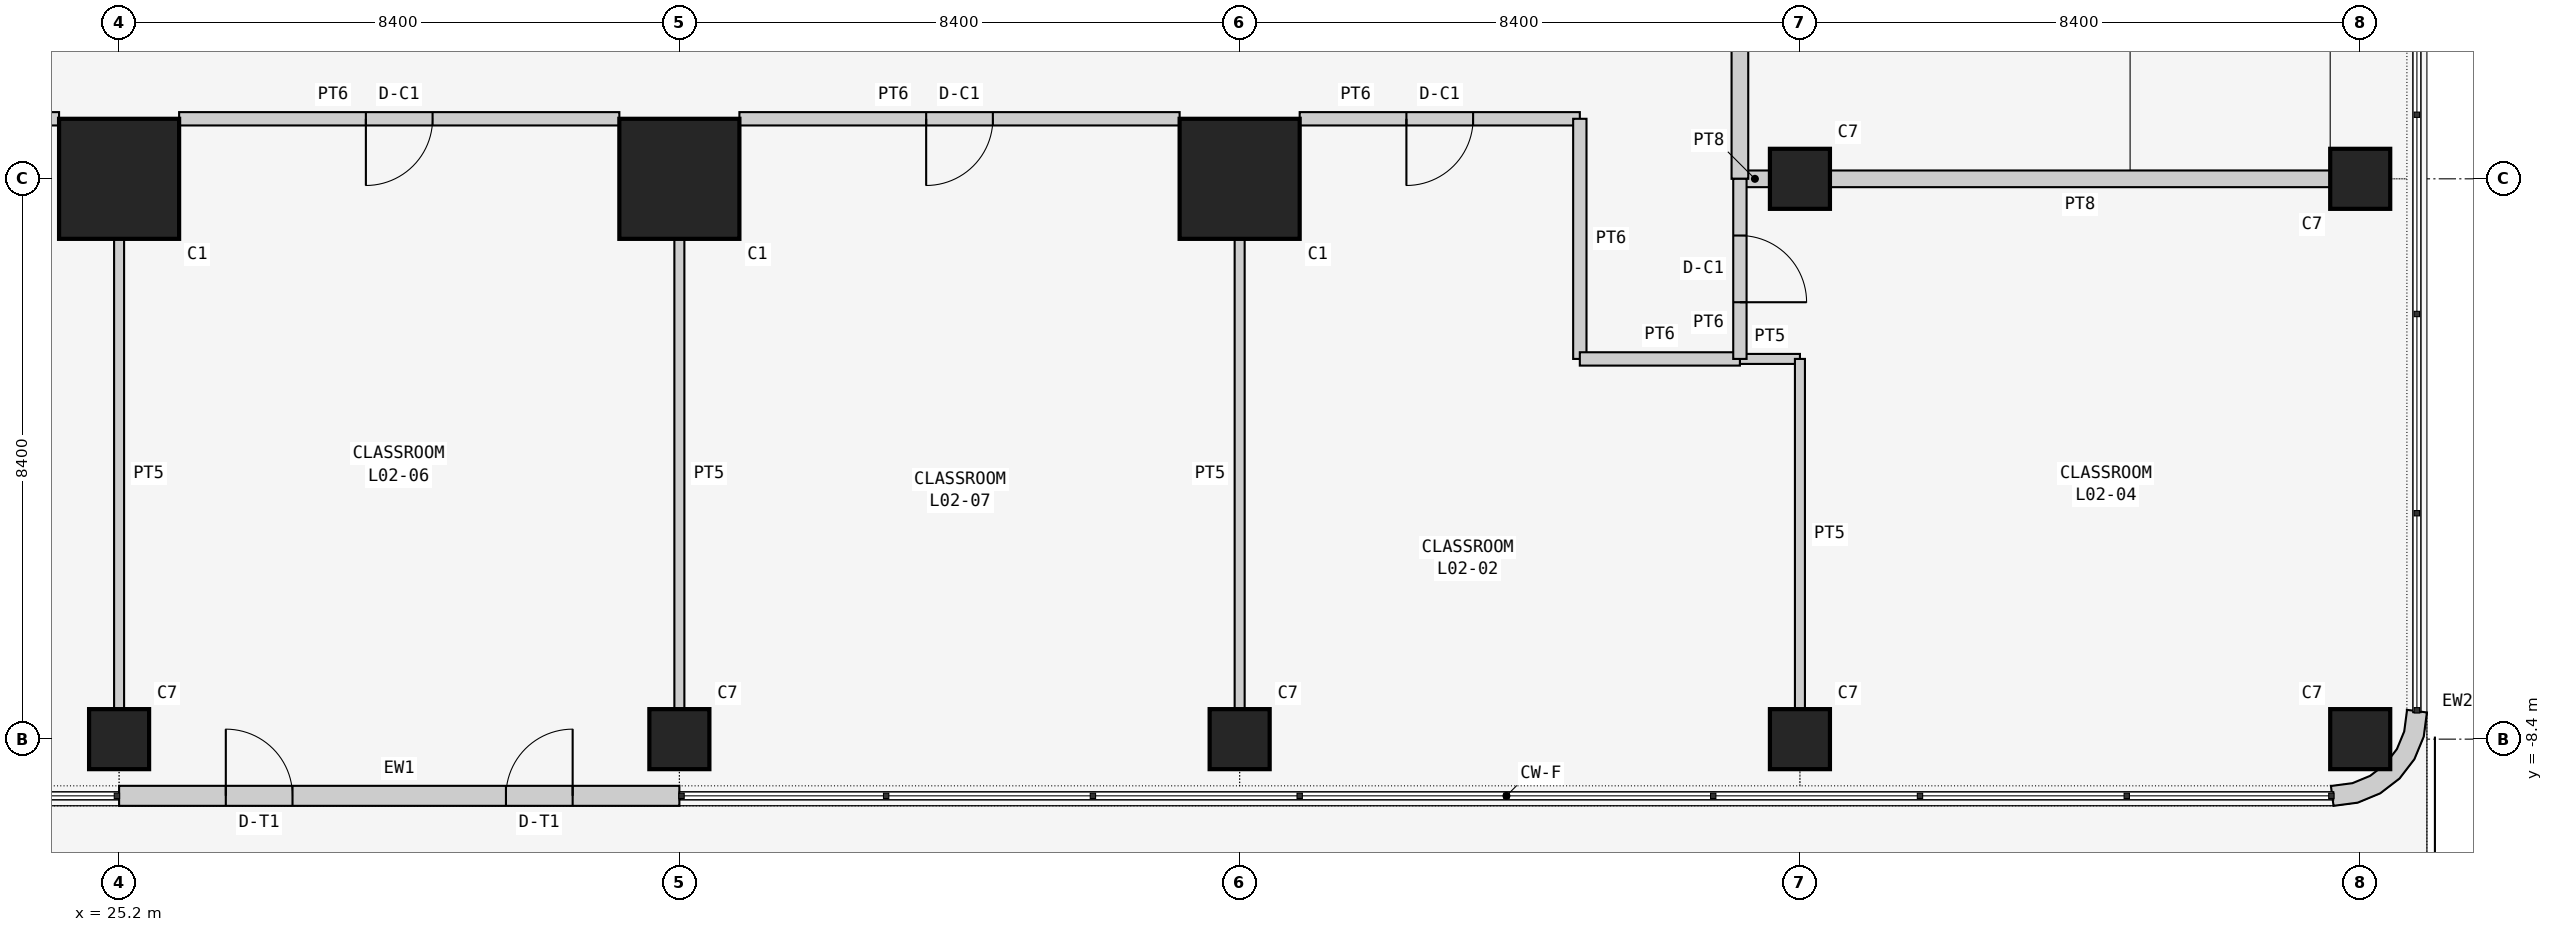
"""IFC4 building model, lengths in metres.
Left out: names, types, materials, properties, quantities, classifications, styles, units other than length and angle.
Written with IfcOpenShell. Run it as: python <this file> out.ifc"""

import sys

from ifc_helpers import new_model, si_unit, direction, frame, frame_2d, origin, origin_2d, place, context, subcontext, project, spatial, polyline, rectangle, outline, extrude, element, fill, save


model = new_model("IFC4")
c1 = context("Model", 3, precision=1e-05, world=origin(), true_north=direction((0.0, 1.0)))
c2 = subcontext(c1, "Body", "Model", "MODEL_VIEW")
j1 = project(units=[si_unit("LENGTHUNIT", "METRE"), si_unit("PLANEANGLEUNIT", "RADIAN")], contexts=[c1])
p1 = place(None, origin())
s1 = spatial("IfcSite", under=j1, at=p1, CompositionType="ELEMENT")
p2 = place(p1, origin())
s2 = spatial("IfcBuilding", under=s1, at=p2, CompositionType="ELEMENT")
p3 = place(p2, frame((0.0, 0.0, 10.5)))
s3 = spatial("IfcBuildingStorey", under=s2, at=p3, CompositionType="ELEMENT", Elevation=10.5)
p4 = place(p3, frame((25.2, -8.4, 0.0), z_axis=(0.0, 0.0, 1.0), x_axis=(1.0, 0.0, 0.0)))
e1 = element("IfcColumn", 1, at=p4, inside=s3, PredefinedType="COLUMN", context=c2, shape_type="SweptSolid", body=[
    extrude(rectangle(XDim=0.9, YDim=0.9, at=origin_2d()), origin(), (0.0, 0.0, 1.0), 4.5),
])
p5 = place(p3, frame((25.2, 0.0, 0.0), z_axis=(0.0, 0.0, 1.0), x_axis=(1.0, 0.0, 0.0)))
e2 = element("IfcColumn", 2, at=p5, inside=s3, PredefinedType="COLUMN", context=c2, shape_type="SweptSolid", body=[
    extrude(rectangle(XDim=1.8, YDim=1.8, at=origin_2d()), origin(), (0.0, 0.0, 1.0), 4.5),
])
p6 = place(p3, frame((33.6, -8.4, 0.0), z_axis=(0.0, 0.0, 1.0), x_axis=(1.0, 0.0, 0.0)))
e3 = element("IfcColumn", 3, at=p6, inside=s3, PredefinedType="COLUMN", context=c2, shape_type="SweptSolid", body=[
    extrude(rectangle(XDim=0.9, YDim=0.9, at=origin_2d()), origin(), (0.0, 0.0, 1.0), 4.5),
])
p7 = place(p3, frame((33.6, 0.0, 0.0), z_axis=(0.0, 0.0, 1.0), x_axis=(1.0, 0.0, 0.0)))
e4 = element("IfcColumn", 4, at=p7, inside=s3, PredefinedType="COLUMN", context=c2, shape_type="SweptSolid", body=[
    extrude(rectangle(XDim=1.8, YDim=1.8, at=origin_2d()), origin(), (0.0, 0.0, 1.0), 4.5),
])
p8 = place(p3, frame((42.0, -8.4, 0.0), z_axis=(0.0, 0.0, 1.0), x_axis=(1.0, 0.0, 0.0)))
e5 = element("IfcColumn", 5, at=p8, inside=s3, PredefinedType="COLUMN", context=c2, shape_type="SweptSolid", body=[
    extrude(rectangle(XDim=0.9, YDim=0.9, at=origin_2d()), origin(), (0.0, 0.0, 1.0), 4.5),
])
p9 = place(p3, frame((42.0, 0.0, 0.0), z_axis=(0.0, 0.0, 1.0), x_axis=(1.0, 0.0, 0.0)))
e6 = element("IfcColumn", 6, at=p9, inside=s3, PredefinedType="COLUMN", context=c2, shape_type="SweptSolid", body=[
    extrude(rectangle(XDim=1.8, YDim=1.8, at=origin_2d()), origin(), (0.0, 0.0, 1.0), 4.5),
])
for number, where, z_axis, x_axis in (
    (7, (50.4, -8.4, 0.0), (0.0, 0.0, 1.0), (1.0, 0.0, 0.0)),
    (8, (50.4, 0.0, 0.0), (0.0, 0.0, 1.0), (1.0, 0.0, 0.0)),
    (9, (58.8, -8.4, 0.0), (0.0, 0.0, 1.0), (1.0, 0.0, 0.0)),
    (10, (58.8, 0.0, 0.0), (0.0, 0.0, 1.0), (1.0, 0.0, 0.0)),
):
    element("IfcColumn", number, at=place(p3, frame(where, z_axis=z_axis, x_axis=x_axis)), inside=s3, PredefinedType="COLUMN", context=c2, shape_type="SweptSolid", body=[
        extrude(rectangle(XDim=0.9, YDim=0.9, at=origin_2d()), origin(), (0.0, 0.0, 1.0), 4.5),
    ])
p10 = place(p3, frame((25.2, -9.25, 0.0), z_axis=(0.0, 0.0, 1.0), x_axis=(1.0, 0.0, 0.0)))
e11 = element("IfcWall", 11, at=p10, inside=s3, PredefinedType="SOLIDWALL", context=c2, shape_type="SweptSolid", body=[
    extrude(rectangle(XDim=8.4, YDim=0.3, at=frame_2d((4.2, 0.0))), origin(), (0.0, 0.0, 1.0), 4.3),
])
p11 = place(p10, frame((1.6, 0.0, 0.0)))
e12 = element("IfcOpeningElement", 12, at=p11, cuts=e11, PredefinedType="OPENING", context=c2, shape_type="SweptSolid", body=[
    extrude(rectangle(XDim=1.0, YDim=2.4, at=frame_2d((0.5, 1.2))), frame((0.0, 0.16, 0.0), z_axis=(0.0, -1.0, 0.0), x_axis=(1.0, 0.0, 0.0)), (0.0, 0.0, 1.0), 0.32),
])
p12 = place(p10, frame((5.8, 0.0, 0.0)))
e13 = element("IfcOpeningElement", 13, at=p12, cuts=e11, PredefinedType="OPENING", context=c2, shape_type="SweptSolid", body=[
    extrude(rectangle(XDim=1.0, YDim=2.4, at=frame_2d((0.5, 1.2))), frame((0.0, 0.16, 0.0), z_axis=(0.0, -1.0, 0.0), x_axis=(1.0, 0.0, 0.0)), (0.0, 0.0, 1.0), 0.32),
])
p13 = place(p3, frame((58.355, -9.248, 0.0), z_axis=(0.0, 0.0, 1.0), x_axis=(0.707106781187, -0.707106781187, 0.0)))
e14 = element("IfcWall", 14, at=p13, inside=s3, PredefinedType="SOLIDWALL", context=c2, shape_type="SweptSolid", body=[
    extrude(outline(polyline([(0.139, 1.904), (-0.101, 1.72), (-0.087, 1.706), (0.1, 1.463), (0.209, 1.198), (0.246, 0.914), (0.209, 0.63), (0.1, 0.365), (-0.087, 0.122), (-0.101, 0.108), (0.139, -0.076), (0.362, 0.214), (0.502, 0.552), (0.549, 0.914), (0.501, 1.276), (0.362, 1.614), (0.139, 1.904)])), origin(), (0.0, 0.0, 1.0), 4.3),
])
p14 = place(p3, frame((49.95, 0.0, 0.0), z_axis=(0.0, 0.0, 1.0), x_axis=(-1.0, 0.0, 0.0)))
e15 = element("IfcWall", 15, at=p14, inside=s3, PredefinedType="SOLIDWALL", context=c2, shape_type="SweptSolid", body=[
    extrude(rectangle(XDim=0.45, YDim=0.25, at=frame_2d((0.225, 0.0))), origin(), (0.0, 0.0, 1.0), 3.543),
])
p15 = place(p3, frame((58.35, 0.0, 0.0), z_axis=(0.0, 0.0, 1.0), x_axis=(-1.0, 0.0, 0.0)))
e16 = element("IfcWall", 16, at=p15, inside=s3, PredefinedType="SOLIDWALL", context=c2, shape_type="SweptSolid", body=[
    extrude(rectangle(XDim=7.5, YDim=0.25, at=frame_2d((3.75, 0.0))), origin(), (0.0, 0.0, 1.0), 3.543),
])
p16 = place(p3, frame((49.5, 0.0, 0.0), z_axis=(0.0, 0.0, 1.0), x_axis=(0.0, 1.0, 0.0)))
e17 = element("IfcWall", 17, at=p16, inside=s3, PredefinedType="SOLIDWALL", context=c2, shape_type="SweptSolid", body=[
    extrude(rectangle(XDim=8.4, YDim=0.25, at=frame_2d((4.2, 0.0))), origin(), (0.0, 0.0, 1.0), 4.3),
])
p17 = place(p16, frame((3.6, 0.0, 0.0)))
e18 = element("IfcOpeningElement", 18, at=p17, cuts=e17, PredefinedType="OPENING", context=c2, shape_type="SweptSolid", body=[
    extrude(rectangle(XDim=1.2, YDim=2.1, at=frame_2d((0.6, 1.05))), frame((0.0, 0.135, 0.0), z_axis=(0.0, -1.0, 0.0), x_axis=(1.0, 0.0, 0.0)), (0.0, 0.0, 1.0), 0.27),
])
p18 = place(p3, frame((49.5, -2.7, 0.0), z_axis=(0.0, 0.0, 1.0), x_axis=(1.0, 0.0, 0.0)))
e19 = element("IfcWall", 19, at=p18, inside=s3, PredefinedType="PARTITIONING", context=c2, shape_type="SweptSolid", body=[
    extrude(rectangle(XDim=0.9, YDim=0.15, at=frame_2d((0.45, 0.0))), origin(), (0.0, 0.0, 1.0), 4.3),
])
p19 = place(p3, frame((50.4, -2.7, 0.0), z_axis=(0.0, 0.0, 1.0), x_axis=(0.0, -1.0, 0.0)))
e20 = element("IfcWall", 20, at=p19, inside=s3, PredefinedType="PARTITIONING", context=c2, shape_type="SweptSolid", body=[
    extrude(rectangle(XDim=5.25, YDim=0.15, at=frame_2d((2.625, 0.0))), origin(), (0.0, 0.0, 1.0), 3.543),
])
p20 = place(p3, frame((42.0, -7.95, 0.0), z_axis=(0.0, 0.0, 1.0), x_axis=(0.0, 1.0, 0.0)))
e21 = element("IfcWall", 21, at=p20, inside=s3, PredefinedType="PARTITIONING", context=c2, shape_type="SweptSolid", body=[
    extrude(rectangle(XDim=7.05, YDim=0.15, at=frame_2d((3.525, 0.0))), origin(), (0.0, 0.0, 1.0), 3.543),
])
p21 = place(p3, frame((42.9, 0.9, 0.0), z_axis=(0.0, 0.0, 1.0), x_axis=(1.0, 0.0, 0.0)))
e22 = element("IfcWall", 22, at=p21, inside=s3, PredefinedType="PARTITIONING", context=c2, shape_type="SweptSolid", body=[
    extrude(rectangle(XDim=4.2, YDim=0.2, at=frame_2d((2.1, 0.0))), origin(), (0.0, 0.0, 1.0), 4.3),
])
p22 = place(p21, frame((1.6, 0.0, 0.0)))
e23 = element("IfcOpeningElement", 23, at=p22, cuts=e22, PredefinedType="OPENING", context=c2, shape_type="SweptSolid", body=[
    extrude(rectangle(XDim=1.0, YDim=2.1, at=frame_2d((0.5, 1.05))), frame((0.0, 0.11, 0.0), z_axis=(0.0, -1.0, 0.0), x_axis=(1.0, 0.0, 0.0)), (0.0, 0.0, 1.0), 0.22),
])
p23 = place(p3, frame((47.1, 0.9, 0.0), z_axis=(0.0, 0.0, 1.0), x_axis=(0.0, -1.0, 0.0)))
e24 = element("IfcWall", 24, at=p23, inside=s3, PredefinedType="PARTITIONING", context=c2, shape_type="SweptSolid", body=[
    extrude(rectangle(XDim=3.6, YDim=0.2, at=frame_2d((1.8, 0.0))), origin(), (0.0, 0.0, 1.0), 4.3),
])
p24 = place(p3, frame((47.1, -2.7, 0.0), z_axis=(0.0, 0.0, 1.0), x_axis=(1.0, 0.0, 0.0)))
e25 = element("IfcWall", 25, at=p24, inside=s3, PredefinedType="PARTITIONING", context=c2, shape_type="SweptSolid", body=[
    extrude(rectangle(XDim=2.4, YDim=0.2, at=frame_2d((1.2, 0.0))), origin(), (0.0, 0.0, 1.0), 4.3),
])
p25 = place(p3, frame((49.5, -2.7, 0.0), z_axis=(0.0, 0.0, 1.0), x_axis=(0.0, 1.0, 0.0)))
e26 = element("IfcWall", 26, at=p25, inside=s3, PredefinedType="PARTITIONING", context=c2, shape_type="SweptSolid", body=[
    extrude(rectangle(XDim=2.7, YDim=0.2, at=frame_2d((1.35, 0.0))), origin(), (0.0, 0.0, 1.0), 4.3),
])
p26 = place(p25, frame((0.85, 0.0, 0.0)))
e27 = element("IfcOpeningElement", 27, at=p26, cuts=e26, PredefinedType="OPENING", context=c2, shape_type="SweptSolid", body=[
    extrude(rectangle(XDim=1.0, YDim=2.1, at=frame_2d((0.5, 1.05))), frame((0.0, 0.11, 0.0), z_axis=(0.0, -1.0, 0.0), x_axis=(1.0, 0.0, 0.0)), (0.0, 0.0, 1.0), 0.22),
])
p27 = place(p3, frame((25.2, -0.9, 0.0), z_axis=(0.0, 0.0, 1.0), x_axis=(0.0, -1.0, 0.0)))
e28 = element("IfcWall", 28, at=p27, inside=s3, PredefinedType="PARTITIONING", context=c2, shape_type="SweptSolid", body=[
    extrude(rectangle(XDim=7.05, YDim=0.15, at=frame_2d((3.525, 0.0))), origin(), (0.0, 0.0, 1.0), 3.543),
])
p28 = place(p3, frame((17.7, 0.9, 0.0), z_axis=(0.0, 0.0, 1.0), x_axis=(1.0, 0.0, 0.0)))
e29 = element("IfcWall", 29, at=p28, inside=s3, PredefinedType="PARTITIONING", context=c2, shape_type="SweptSolid", body=[
    extrude(rectangle(XDim=6.6, YDim=0.2, at=frame_2d((3.3, 0.0))), origin(), (0.0, 0.0, 1.0), 4.3),
])
p29 = place(p28, frame((2.8, 0.0, 0.0)))
e30 = element("IfcOpeningElement", 30, at=p29, cuts=e29, PredefinedType="OPENING", context=c2, shape_type="SweptSolid", body=[
    extrude(rectangle(XDim=1.0, YDim=2.1, at=frame_2d((0.5, 1.05))), frame((0.0, 0.11, 0.0), z_axis=(0.0, -1.0, 0.0), x_axis=(1.0, 0.0, 0.0)), (0.0, 0.0, 1.0), 0.22),
])
p30 = place(p3, frame((33.6, -0.9, 0.0), z_axis=(0.0, 0.0, 1.0), x_axis=(0.0, -1.0, 0.0)))
e31 = element("IfcWall", 31, at=p30, inside=s3, PredefinedType="PARTITIONING", context=c2, shape_type="SweptSolid", body=[
    extrude(rectangle(XDim=7.05, YDim=0.15, at=frame_2d((3.525, 0.0))), origin(), (0.0, 0.0, 1.0), 3.543),
])
p31 = place(p3, frame((26.1, 0.9, 0.0), z_axis=(0.0, 0.0, 1.0), x_axis=(1.0, 0.0, 0.0)))
e32 = element("IfcWall", 32, at=p31, inside=s3, PredefinedType="PARTITIONING", context=c2, shape_type="SweptSolid", body=[
    extrude(rectangle(XDim=6.6, YDim=0.2, at=frame_2d((3.3, 0.0))), origin(), (0.0, 0.0, 1.0), 4.3),
])
p32 = place(p31, frame((2.8, 0.0, 0.0)))
e33 = element("IfcOpeningElement", 33, at=p32, cuts=e32, PredefinedType="OPENING", context=c2, shape_type="SweptSolid", body=[
    extrude(rectangle(XDim=1.0, YDim=2.1, at=frame_2d((0.5, 1.05))), frame((0.0, 0.11, 0.0), z_axis=(0.0, -1.0, 0.0), x_axis=(1.0, 0.0, 0.0)), (0.0, 0.0, 1.0), 0.22),
])
p33 = place(p3, frame((34.5, 0.9, 0.0), z_axis=(0.0, 0.0, 1.0), x_axis=(1.0, 0.0, 0.0)))
e34 = element("IfcWall", 34, at=p33, inside=s3, PredefinedType="PARTITIONING", context=c2, shape_type="SweptSolid", body=[
    extrude(rectangle(XDim=6.6, YDim=0.2, at=frame_2d((3.3, 0.0))), origin(), (0.0, 0.0, 1.0), 4.3),
])
p34 = place(p33, frame((2.8, 0.0, 0.0)))
e35 = element("IfcOpeningElement", 35, at=p34, cuts=e34, PredefinedType="OPENING", context=c2, shape_type="SweptSolid", body=[
    extrude(rectangle(XDim=1.0, YDim=2.1, at=frame_2d((0.5, 1.05))), frame((0.0, 0.11, 0.0), z_axis=(0.0, -1.0, 0.0), x_axis=(1.0, 0.0, 0.0)), (0.0, 0.0, 1.0), 0.22),
])
p35 = place(p11, origin())
e36 = element("IfcDoor", 36, at=p35, inside=s3, OperationType="SINGLE_SWING_LEFT", PredefinedType="DOOR", context=c2, shape_type="SweptSolid", body=[
    extrude(rectangle(XDim=1.0, YDim=2.4, at=frame_2d((0.5, 1.2))), frame((0.0, 0.025, 0.0), z_axis=(0.0, -1.0, 0.0), x_axis=(1.0, 0.0, 0.0)), (0.0, 0.0, 1.0), 0.05),
])
fill(e12, e36)
p36 = place(p12, origin())
e37 = element("IfcDoor", 37, at=p36, inside=s3, OperationType="SINGLE_SWING_RIGHT", PredefinedType="DOOR", context=c2, shape_type="SweptSolid", body=[
    extrude(rectangle(XDim=1.0, YDim=2.4, at=frame_2d((0.5, 1.2))), frame((0.0, 0.025, 0.0), z_axis=(0.0, -1.0, 0.0), x_axis=(1.0, 0.0, 0.0)), (0.0, 0.0, 1.0), 0.05),
])
fill(e13, e37)
p37 = place(p22, frame((1.0, 0.0, 0.0), z_axis=(0.0, 0.0, 1.0), x_axis=(-1.0, 0.0, 0.0)))
e38 = element("IfcDoor", 38, at=p37, inside=s3, OperationType="SINGLE_SWING_RIGHT", PredefinedType="DOOR", context=c2, shape_type="SweptSolid", body=[
    extrude(rectangle(XDim=1.0, YDim=2.1, at=frame_2d((0.5, 1.05))), frame((0.0, 0.025, 0.0), z_axis=(0.0, -1.0, 0.0), x_axis=(1.0, 0.0, 0.0)), (0.0, 0.0, 1.0), 0.05),
])
fill(e23, e38)
p38 = place(p26, frame((1.0, 0.0, 0.0), z_axis=(0.0, 0.0, 1.0), x_axis=(-1.0, 0.0, 0.0)))
e39 = element("IfcDoor", 39, at=p38, inside=s3, OperationType="SINGLE_SWING_RIGHT", PredefinedType="DOOR", context=c2, shape_type="SweptSolid", body=[
    extrude(rectangle(XDim=1.0, YDim=2.1, at=frame_2d((0.5, 1.05))), frame((0.0, 0.025, 0.0), z_axis=(0.0, -1.0, 0.0), x_axis=(1.0, 0.0, 0.0)), (0.0, 0.0, 1.0), 0.05),
])
fill(e27, e39)
p39 = place(p32, frame((1.0, 0.0, 0.0), z_axis=(0.0, 0.0, 1.0), x_axis=(-1.0, 0.0, 0.0)))
e40 = element("IfcDoor", 40, at=p39, inside=s3, OperationType="SINGLE_SWING_RIGHT", PredefinedType="DOOR", context=c2, shape_type="SweptSolid", body=[
    extrude(rectangle(XDim=1.0, YDim=2.1, at=frame_2d((0.5, 1.05))), frame((0.0, 0.025, 0.0), z_axis=(0.0, -1.0, 0.0), x_axis=(1.0, 0.0, 0.0)), (0.0, 0.0, 1.0), 0.05),
])
fill(e33, e40)
p40 = place(p34, frame((1.0, 0.0, 0.0), z_axis=(0.0, 0.0, 1.0), x_axis=(-1.0, 0.0, 0.0)))
e41 = element("IfcDoor", 41, at=p40, inside=s3, OperationType="SINGLE_SWING_RIGHT", PredefinedType="DOOR", context=c2, shape_type="SweptSolid", body=[
    extrude(rectangle(XDim=1.0, YDim=2.1, at=frame_2d((0.5, 1.05))), frame((0.0, 0.025, 0.0), z_axis=(0.0, -1.0, 0.0), x_axis=(1.0, 0.0, 0.0)), (0.0, 0.0, 1.0), 0.05),
])
fill(e35, e41)
save(model, sys.argv[1])
